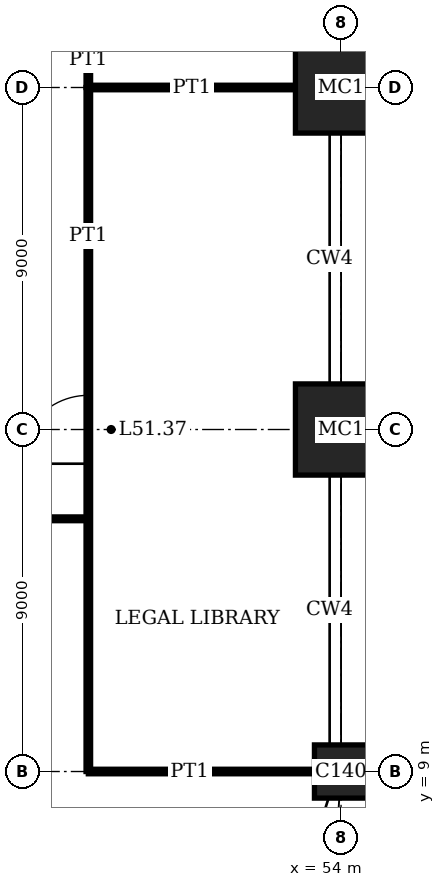
"""IFC4 building model, lengths in metres.
Left out: names, types, materials, properties, quantities, classifications, styles, units other than length and angle.
Written with IfcOpenShell. Run it as: python <this file> out.ifc"""

import sys

from ifc_helpers import new_model, si_unit, direction, frame, frame_2d, origin, origin_2d, place, context, subcontext, project, spatial, rectangle, extrude, element, fill, save


model = new_model("IFC4")
c1 = context("Model", 3, precision=1e-05, world=origin(), true_north=direction((0.0, 1.0)))
c2 = subcontext(c1, "Body", "Model", "MODEL_VIEW")
j1 = project(units=[si_unit("LENGTHUNIT", "METRE"), si_unit("PLANEANGLEUNIT", "RADIAN")], contexts=[c1])
p1 = place(None, origin())
s1 = spatial("IfcSite", under=j1, at=p1, CompositionType="ELEMENT")
p2 = place(p1, origin())
s2 = spatial("IfcBuilding", under=s1, at=p2, CompositionType="ELEMENT")
p3 = place(p2, frame((0.0, 0.0, 210.2)))
s3 = spatial("IfcBuildingStorey", under=s2, at=p3, CompositionType="ELEMENT", Elevation=210.2)
p4 = place(p3, frame((54.0, 9.0, 0.0), z_axis=(0.0, 0.0, 1.0), x_axis=(1.0, 0.0, 0.0)))
e1 = element("IfcColumn", 1, at=p4, inside=s3, PredefinedType="COLUMN", context=c2, shape_type="SweptSolid", body=[
    extrude(rectangle(XDim=1.4, YDim=1.4, at=origin_2d()), origin(), (0.0, 0.0, 1.0), 4.0),
])
for number, where, z_axis, x_axis in (
    (2, (54.0, 18.0, 0.0), (0.0, 0.0, 1.0), (1.0, 0.0, 0.0)),
    (3, (54.0, 27.0, 0.0), (0.0, 0.0, 1.0), (1.0, 0.0, 0.0)),
):
    element("IfcColumn", number, at=place(p3, frame(where, z_axis=z_axis, x_axis=x_axis)), inside=s3, PredefinedType="COLUMN", context=c2, shape_type="SweptSolid", body=[
        extrude(rectangle(XDim=2.4, YDim=2.4, at=origin_2d()), origin(), (0.0, 0.0, 1.0), 4.0),
    ])
p5 = place(p3, frame((47.35, 9.0, 0.0), z_axis=(0.0, 0.0, 1.0), x_axis=(1.0, 0.0, 0.0)))
e4 = element("IfcWall", 4, at=p5, inside=s3, PredefinedType="PARTITIONING", context=c2, shape_type="SweptSolid", body=[
    extrude(rectangle(XDim=5.95, YDim=0.12, at=frame_2d((2.975, 0.0))), origin(), (0.0, 0.0, 1.0), 3.05),
])
p6 = place(p3, frame((22.5, 15.65, 0.0), z_axis=(0.0, 0.0, 1.0), x_axis=(1.0, 0.0, 0.0)))
e5 = element("IfcWall", 5, at=p6, inside=s3, PredefinedType="PARTITIONING", context=c2, shape_type="SweptSolid", body=[
    extrude(rectangle(XDim=24.85, YDim=0.1, at=frame_2d((12.425, 0.0))), origin(), (0.0, 0.0, 1.0), 3.75),
])
p7 = place(p6, frame((11.925, 0.0, 0.0)))
e6 = element("IfcOpeningElement", 6, at=p7, cuts=e5, PredefinedType="OPENING", context=c2, shape_type="SweptSolid", body=[
    extrude(rectangle(XDim=1.0, YDim=2.4, at=frame_2d((0.5, 1.2))), frame((0.0, 0.06, 0.0), z_axis=(0.0, -1.0, 0.0), x_axis=(1.0, 0.0, 0.0)), (0.0, 0.0, 1.0), 0.12),
])
p8 = place(p3, frame((47.35, 27.0, 0.0), z_axis=(0.0, 0.0, 1.0), x_axis=(1.0, 0.0, 0.0)))
e7 = element("IfcWall", 7, at=p8, inside=s3, PredefinedType="PARTITIONING", context=c2, shape_type="SweptSolid", body=[
    extrude(rectangle(XDim=5.45, YDim=0.12, at=frame_2d((2.725, 0.0))), origin(), (0.0, 0.0, 1.0), 3.05),
])
p9 = place(p3, frame((47.35, 9.0, 0.0), z_axis=(0.0, 0.0, 1.0), x_axis=(0.0, 1.0, 0.0)))
e8 = element("IfcWall", 8, at=p9, inside=s3, PredefinedType="PARTITIONING", context=c2, shape_type="SweptSolid", body=[
    extrude(rectangle(XDim=18.0, YDim=0.12, at=frame_2d((9.0, 0.0))), origin(), (0.0, 0.0, 1.0), 3.75),
])
p10 = place(p9, frame((8.1, 0.0, 0.0)))
e9 = element("IfcOpeningElement", 9, at=p10, cuts=e8, PredefinedType="OPENING", context=c2, shape_type="SweptSolid", body=[
    extrude(rectangle(XDim=1.8, YDim=2.4, at=frame_2d((0.9, 1.2))), frame((0.0, 0.07, 0.0), z_axis=(0.0, -1.0, 0.0), x_axis=(1.0, 0.0, 0.0)), (0.0, 0.0, 1.0), 0.14),
])
p11 = place(p3, frame((47.35, 27.0, 0.0), z_axis=(0.0, 0.0, 1.0), x_axis=(0.0, 1.0, 0.0)))
e10 = element("IfcWall", 10, at=p11, inside=s3, PredefinedType="PARTITIONING", context=c2, shape_type="SweptSolid", body=[
    extrude(rectangle(XDim=4.5, YDim=0.12, at=frame_2d((2.25, 0.0))), origin(), (0.0, 0.0, 1.0), 3.75),
])
p12 = place(p11, frame((1.75, 0.0, 0.0)))
e11 = element("IfcOpeningElement", 11, at=p12, cuts=e10, PredefinedType="OPENING", context=c2, shape_type="SweptSolid", body=[
    extrude(rectangle(XDim=1.0, YDim=2.4, at=frame_2d((0.5, 1.2))), frame((0.0, 0.07, 0.0), z_axis=(0.0, -1.0, 0.0), x_axis=(1.0, 0.0, 0.0)), (0.0, 0.0, 1.0), 0.14),
])
p13 = place(p10, origin())
e12 = element("IfcDoor", 12, at=p13, inside=s3, OperationType="DOUBLE_DOOR_SINGLE_SWING", PredefinedType="DOOR", context=c2, shape_type="SweptSolid", body=[
    extrude(rectangle(XDim=1.8, YDim=2.4, at=frame_2d((0.9, 1.2))), frame((0.0, 0.025, 0.0), z_axis=(0.0, -1.0, 0.0), x_axis=(1.0, 0.0, 0.0)), (0.0, 0.0, 1.0), 0.05),
])
fill(e9, e12)
save(model, sys.argv[1])
